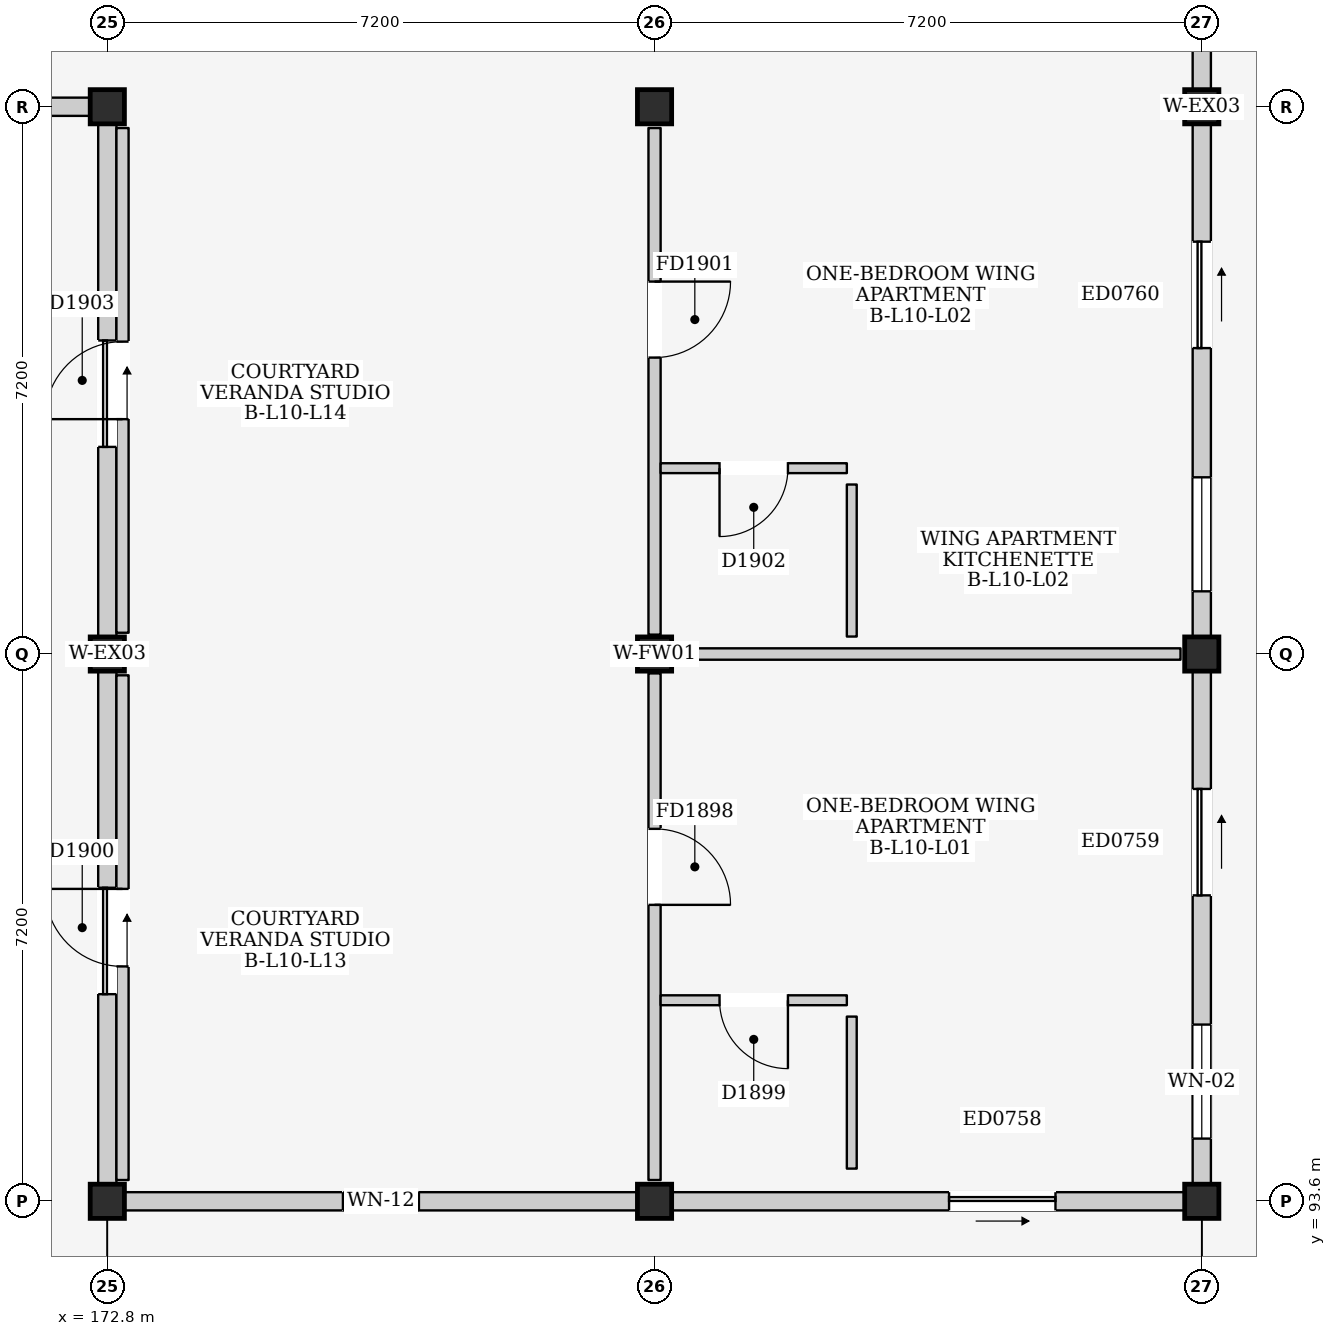
"""IFC4 building model, lengths in metres.
Left out: names, types, materials, properties, quantities, classifications, styles, units other than length and angle.
Written with IfcOpenShell. Run it as: python <this file> out.ifc"""

import sys

from ifc_helpers import new_model, si_unit, direction, frame, frame_2d, origin, origin_2d, place, context, subcontext, project, spatial, rectangle, extrude, element, fill, save


model = new_model("IFC4")
c1 = context("Model", 3, precision=1e-05, world=origin(), true_north=direction((0.0, 1.0)))
c2 = subcontext(c1, "Body", "Model", "MODEL_VIEW")
j1 = project(units=[si_unit("LENGTHUNIT", "METRE"), si_unit("PLANEANGLEUNIT", "RADIAN")], contexts=[c1])
p1 = place(None, origin())
s1 = spatial("IfcSite", under=j1, at=p1, CompositionType="ELEMENT")
p2 = place(p1, origin())
s2 = spatial("IfcBuilding", under=s1, at=p2, CompositionType="ELEMENT")
p3 = place(p2, frame((0.0, 0.0, 34.8)))
s3 = spatial("IfcBuildingStorey", under=s2, at=p3, CompositionType="ELEMENT", Elevation=34.8)
for number, where, z_axis, x_axis in (
    (1, (172.8, 93.6, 0.0), (0.0, 0.0, 1.0), (1.0, 0.0, 0.0)),
    (2, (172.8, 100.8, 0.0), (0.0, 0.0, 1.0), (1.0, 0.0, 0.0)),
    (3, (172.8, 108.0, 0.0), (0.0, 0.0, 1.0), (1.0, 0.0, 0.0)),
    (4, (180.0, 93.6, 0.0), (0.0, 0.0, 1.0), (1.0, 0.0, 0.0)),
    (5, (180.0, 100.8, 0.0), (0.0, 0.0, 1.0), (1.0, 0.0, 0.0)),
    (6, (180.0, 108.0, 0.0), (0.0, 0.0, 1.0), (1.0, 0.0, 0.0)),
    (7, (187.2, 93.6, 0.0), (0.0, 0.0, 1.0), (1.0, 0.0, 0.0)),
    (8, (187.2, 100.8, 0.0), (0.0, 0.0, 1.0), (1.0, 0.0, 0.0)),
    (9, (187.2, 108.0, 0.0), (0.0, 0.0, 1.0), (1.0, 0.0, 0.0)),
):
    element("IfcColumn", number, at=place(p3, frame(where, z_axis=z_axis, x_axis=x_axis)), inside=s3, PredefinedType="COLUMN", context=c2, shape_type="SweptSolid", body=[
        extrude(rectangle(XDim=0.45, YDim=0.45, at=origin_2d()), origin(), (0.0, 0.0, 1.0), 3.2),
    ])
p4 = place(p3, frame((165.825, 108.0, 0.0), z_axis=(0.0, 0.0, 1.0), x_axis=(1.0, 0.0, 0.0)))
e10 = element("IfcWall", 10, at=p4, inside=s3, PredefinedType="ELEMENTEDWALL", context=c2, shape_type="SweptSolid", body=[
    extrude(rectangle(XDim=6.75, YDim=0.24, at=frame_2d((3.375, 0.0))), origin(), (0.0, 0.0, 1.0), 2.345),
])
p5 = place(p4, frame((2.875, 0.0, 1.2)))
e11 = element("IfcOpeningElement", 11, at=p5, cuts=e10, PredefinedType="OPENING", context=c2, shape_type="SweptSolid", body=[
    extrude(rectangle(XDim=1.0, YDim=0.9, at=frame_2d((0.5, 0.45))), frame((0.0, 0.135, 0.0), z_axis=(0.0, -1.0, 0.0), x_axis=(1.0, 0.0, 0.0)), (0.0, 0.0, 1.0), 0.27),
])
p6 = place(p3, frame((173.025, 93.6, 0.0), z_axis=(0.0, 0.0, 1.0), x_axis=(1.0, 0.0, 0.0)))
e12 = element("IfcWall", 12, at=p6, inside=s3, PredefinedType="ELEMENTEDWALL", context=c2, shape_type="SweptSolid", body=[
    extrude(rectangle(XDim=6.75, YDim=0.24, at=frame_2d((3.375, 0.0))), origin(), (0.0, 0.0, 1.0), 2.345),
])
p7 = place(p6, frame((2.875, 0.0, 1.1)))
e13 = element("IfcOpeningElement", 13, at=p7, cuts=e12, PredefinedType="OPENING", context=c2, shape_type="SweptSolid", body=[
    extrude(rectangle(XDim=1.0, YDim=0.9, at=frame_2d((0.5, 0.45))), frame((0.0, 0.135, 0.0), z_axis=(0.0, -1.0, 0.0), x_axis=(1.0, 0.0, 0.0)), (0.0, 0.0, 1.0), 0.27),
])
p8 = place(p3, frame((172.8, 93.825, 0.0), z_axis=(0.0, 0.0, 1.0), x_axis=(0.0, 1.0, 0.0)))
e14 = element("IfcWall", 14, at=p8, inside=s3, PredefinedType="ELEMENTEDWALL", context=c2, shape_type="SweptSolid", body=[
    extrude(rectangle(XDim=6.75, YDim=0.24, at=frame_2d((3.375, 0.0))), origin(), (0.0, 0.0, 1.0), 2.445),
])
p9 = place(p8, frame((2.5, 0.0, 0.0)))
e15 = element("IfcOpeningElement", 15, at=p9, cuts=e14, PredefinedType="OPENING", context=c2, shape_type="SweptSolid", body=[
    extrude(rectangle(XDim=1.4, YDim=2.1, at=frame_2d((0.7, 1.05))), frame((0.0, 0.135, 0.0), z_axis=(0.0, -1.0, 0.0), x_axis=(1.0, 0.0, 0.0)), (0.0, 0.0, 1.0), 0.27),
])
p10 = place(p3, frame((172.8, 101.025, 0.0), z_axis=(0.0, 0.0, 1.0), x_axis=(0.0, 1.0, 0.0)))
e16 = element("IfcWall", 16, at=p10, inside=s3, PredefinedType="ELEMENTEDWALL", context=c2, shape_type="SweptSolid", body=[
    extrude(rectangle(XDim=6.75, YDim=0.24, at=frame_2d((3.375, 0.0))), origin(), (0.0, 0.0, 1.0), 2.445),
])
p11 = place(p10, frame((2.5, 0.0, 0.0)))
e17 = element("IfcOpeningElement", 17, at=p11, cuts=e16, PredefinedType="OPENING", context=c2, shape_type="SweptSolid", body=[
    extrude(rectangle(XDim=1.4, YDim=2.1, at=frame_2d((0.7, 1.05))), frame((0.0, 0.135, 0.0), z_axis=(0.0, -1.0, 0.0), x_axis=(1.0, 0.0, 0.0)), (0.0, 0.0, 1.0), 0.27),
])
p12 = place(p3, frame((180.225, 93.6, 0.0), z_axis=(0.0, 0.0, 1.0), x_axis=(1.0, 0.0, 0.0)))
e18 = element("IfcWall", 18, at=p12, inside=s3, PredefinedType="ELEMENTEDWALL", context=c2, shape_type="SweptSolid", body=[
    extrude(rectangle(XDim=6.75, YDim=0.24, at=frame_2d((3.375, 0.0))), origin(), (0.0, 0.0, 1.0), 2.345),
])
p13 = place(p12, frame((3.65, 0.0, 0.0)))
e19 = element("IfcOpeningElement", 19, at=p13, cuts=e18, PredefinedType="OPENING", context=c2, shape_type="SweptSolid", body=[
    extrude(rectangle(XDim=1.4, YDim=2.1, at=frame_2d((0.7, 1.05))), frame((0.0, 0.135, 0.0), z_axis=(0.0, -1.0, 0.0), x_axis=(1.0, 0.0, 0.0)), (0.0, 0.0, 1.0), 0.27),
])
p14 = place(p3, frame((187.2, 93.825, 0.0), z_axis=(0.0, 0.0, 1.0), x_axis=(0.0, 1.0, 0.0)))
e20 = element("IfcWall", 20, at=p14, inside=s3, PredefinedType="ELEMENTEDWALL", context=c2, shape_type="SweptSolid", body=[
    extrude(rectangle(XDim=6.75, YDim=0.24, at=frame_2d((3.375, 0.0))), origin(), (0.0, 0.0, 1.0), 2.495),
])
p15 = place(p14, frame((3.8, 0.0, 0.0)))
e21 = element("IfcOpeningElement", 21, at=p15, cuts=e20, PredefinedType="OPENING", context=c2, shape_type="SweptSolid", body=[
    extrude(rectangle(XDim=1.4, YDim=2.1, at=frame_2d((0.7, 1.05))), frame((0.0, 0.135, 0.0), z_axis=(0.0, -1.0, 0.0), x_axis=(1.0, 0.0, 0.0)), (0.0, 0.0, 1.0), 0.27),
])
p16 = place(p14, frame((0.6, 0.0, 0.885)))
e22 = element("IfcOpeningElement", 22, at=p16, cuts=e20, PredefinedType="OPENING", context=c2, shape_type="SweptSolid", body=[
    extrude(rectangle(XDim=1.5, YDim=1.5, at=frame_2d((0.75, 0.75))), frame((0.0, 0.135, 0.0), z_axis=(0.0, -1.0, 0.0), x_axis=(1.0, 0.0, 0.0)), (0.0, 0.0, 1.0), 0.27),
])
p17 = place(p3, frame((187.2, 101.025, 0.0), z_axis=(0.0, 0.0, 1.0), x_axis=(0.0, 1.0, 0.0)))
e23 = element("IfcWall", 23, at=p17, inside=s3, PredefinedType="ELEMENTEDWALL", context=c2, shape_type="SweptSolid", body=[
    extrude(rectangle(XDim=6.75, YDim=0.24, at=frame_2d((3.375, 0.0))), origin(), (0.0, 0.0, 1.0), 2.495),
])
p18 = place(p17, frame((3.8, 0.0, 0.0)))
e24 = element("IfcOpeningElement", 24, at=p18, cuts=e23, PredefinedType="OPENING", context=c2, shape_type="SweptSolid", body=[
    extrude(rectangle(XDim=1.4, YDim=2.1, at=frame_2d((0.7, 1.05))), frame((0.0, 0.135, 0.0), z_axis=(0.0, -1.0, 0.0), x_axis=(1.0, 0.0, 0.0)), (0.0, 0.0, 1.0), 0.27),
])
p19 = place(p17, frame((0.6, 0.0, 0.885)))
e25 = element("IfcOpeningElement", 25, at=p19, cuts=e23, PredefinedType="OPENING", context=c2, shape_type="SweptSolid", body=[
    extrude(rectangle(XDim=1.5, YDim=1.5, at=frame_2d((0.75, 0.75))), frame((0.0, 0.135, 0.0), z_axis=(0.0, -1.0, 0.0), x_axis=(1.0, 0.0, 0.0)), (0.0, 0.0, 1.0), 0.27),
])
p20 = place(p3, frame((187.2, 108.225, 0.0), z_axis=(0.0, 0.0, 1.0), x_axis=(0.0, 1.0, 0.0)))
e26 = element("IfcWall", 26, at=p20, inside=s3, PredefinedType="ELEMENTEDWALL", context=c2, shape_type="SweptSolid", body=[
    extrude(rectangle(XDim=6.75, YDim=0.24, at=frame_2d((3.375, 0.0))), origin(), (0.0, 0.0, 1.0), 2.495),
])
p21 = place(p20, frame((3.65, 0.0, 0.0)))
e27 = element("IfcOpeningElement", 27, at=p21, cuts=e26, PredefinedType="OPENING", context=c2, shape_type="SweptSolid", body=[
    extrude(rectangle(XDim=1.4, YDim=2.1, at=frame_2d((0.7, 1.05))), frame((0.0, 0.135, 0.0), z_axis=(0.0, -1.0, 0.0), x_axis=(1.0, 0.0, 0.0)), (0.0, 0.0, 1.0), 0.27),
])
p22 = place(p3, frame((180.0, 93.88, 0.0), z_axis=(0.0, 0.0, 1.0), x_axis=(0.0, 1.0, 0.0)))
e28 = element("IfcWall", 28, at=p22, inside=s3, PredefinedType="PARTITIONING", context=c2, shape_type="SweptSolid", body=[
    extrude(rectangle(XDim=6.665, YDim=0.16, at=frame_2d((3.333, 0.0))), origin(), (0.0, 0.0, 1.0), 2.445),
])
p23 = place(p22, frame((3.62, 0.0, 0.0)))
e29 = element("IfcOpeningElement", 29, at=p23, cuts=e28, PredefinedType="OPENING", context=c2, shape_type="SweptSolid", body=[
    extrude(rectangle(XDim=1.0, YDim=2.15, at=frame_2d((0.5, 1.075))), frame((0.0, 0.095, 0.0), z_axis=(0.0, -1.0, 0.0), x_axis=(1.0, 0.0, 0.0)), (0.0, 0.0, 1.0), 0.19),
])
p24 = place(p3, frame((180.28, 100.8, 0.0), z_axis=(0.0, 0.0, 1.0), x_axis=(1.0, 0.0, 0.0)))
e30 = element("IfcWall", 30, at=p24, inside=s3, PredefinedType="PARTITIONING", context=c2, shape_type="SweptSolid", body=[
    extrude(rectangle(XDim=6.64, YDim=0.15, at=frame_2d((3.32, 0.0))), origin(), (0.0, 0.0, 1.0), 2.345),
])
p25 = place(p3, frame((180.08, 96.245, 0.0), z_axis=(0.0, 0.0, 1.0), x_axis=(1.0, 0.0, 0.0)))
e31 = element("IfcWall", 31, at=p25, inside=s3, PredefinedType="PARTITIONING", context=c2, shape_type="SweptSolid", body=[
    extrude(rectangle(XDim=2.45, YDim=0.13, at=frame_2d((1.225, 0.0))), origin(), (0.0, 0.0, 1.0), 2.96),
])
p26 = place(p25, frame((0.775, 0.0, 0.0)))
e32 = element("IfcOpeningElement", 32, at=p26, cuts=e31, PredefinedType="OPENING", context=c2, shape_type="SweptSolid", body=[
    extrude(rectangle(XDim=0.9, YDim=2.1, at=frame_2d((0.45, 1.05))), frame((0.0, 0.08, 0.0), z_axis=(0.0, -1.0, 0.0), x_axis=(1.0, 0.0, 0.0)), (0.0, 0.0, 1.0), 0.16),
])
p27 = place(p3, frame((182.595, 94.03, 0.0), z_axis=(0.0, 0.0, 1.0), x_axis=(0.0, 1.0, 0.0)))
e33 = element("IfcWall", 33, at=p27, inside=s3, PredefinedType="PARTITIONING", context=c2, shape_type="SweptSolid", body=[
    extrude(rectangle(XDim=2.0, YDim=0.13, at=frame_2d((1.0, 0.0))), origin(), (0.0, 0.0, 1.0), 2.96),
])
p28 = place(p3, frame((173.0, 93.88, 0.0), z_axis=(0.0, 0.0, 1.0), x_axis=(0.0, 1.0, 0.0)))
e34 = element("IfcWall", 34, at=p28, inside=s3, PredefinedType="PARTITIONING", context=c2, shape_type="SweptSolid", body=[
    extrude(rectangle(XDim=6.64, YDim=0.16, at=frame_2d((3.32, 0.0))), origin(), (0.0, 0.0, 1.0), 2.96),
])
p29 = place(p28, frame((2.81, 0.0, 0.0)))
e35 = element("IfcOpeningElement", 35, at=p29, cuts=e34, PredefinedType="OPENING", context=c2, shape_type="SweptSolid", body=[
    extrude(rectangle(XDim=1.02, YDim=2.18, at=frame_2d((0.51, 1.09))), frame((0.0, 0.095, 0.0), z_axis=(0.0, -1.0, 0.0), x_axis=(1.0, 0.0, 0.0)), (0.0, 0.0, 1.0), 0.19),
])
p30 = place(p3, frame((180.0, 101.055, 0.0), z_axis=(0.0, 0.0, 1.0), x_axis=(0.0, 1.0, 0.0)))
e36 = element("IfcWall", 36, at=p30, inside=s3, PredefinedType="PARTITIONING", context=c2, shape_type="SweptSolid", body=[
    extrude(rectangle(XDim=6.665, YDim=0.16, at=frame_2d((3.333, 0.0))), origin(), (0.0, 0.0, 1.0), 2.445),
])
p31 = place(p30, frame((3.645, 0.0, 0.0)))
e37 = element("IfcOpeningElement", 37, at=p31, cuts=e36, PredefinedType="OPENING", context=c2, shape_type="SweptSolid", body=[
    extrude(rectangle(XDim=1.0, YDim=2.15, at=frame_2d((0.5, 1.075))), frame((0.0, 0.095, 0.0), z_axis=(0.0, -1.0, 0.0), x_axis=(1.0, 0.0, 0.0)), (0.0, 0.0, 1.0), 0.19),
])
p32 = place(p3, frame((180.08, 103.245, 0.0), z_axis=(0.0, 0.0, 1.0), x_axis=(1.0, 0.0, 0.0)))
e38 = element("IfcWall", 38, at=p32, inside=s3, PredefinedType="PARTITIONING", context=c2, shape_type="SweptSolid", body=[
    extrude(rectangle(XDim=2.45, YDim=0.13, at=frame_2d((1.225, 0.0))), origin(), (0.0, 0.0, 1.0), 2.96),
])
p33 = place(p32, frame((0.775, 0.0, 0.0)))
e39 = element("IfcOpeningElement", 39, at=p33, cuts=e38, PredefinedType="OPENING", context=c2, shape_type="SweptSolid", body=[
    extrude(rectangle(XDim=0.9, YDim=2.1, at=frame_2d((0.45, 1.05))), frame((0.0, 0.08, 0.0), z_axis=(0.0, -1.0, 0.0), x_axis=(1.0, 0.0, 0.0)), (0.0, 0.0, 1.0), 0.16),
])
p34 = place(p3, frame((182.595, 101.03, 0.0), z_axis=(0.0, 0.0, 1.0), x_axis=(0.0, 1.0, 0.0)))
e40 = element("IfcWall", 40, at=p34, inside=s3, PredefinedType="PARTITIONING", context=c2, shape_type="SweptSolid", body=[
    extrude(rectangle(XDim=2.0, YDim=0.13, at=frame_2d((1.0, 0.0))), origin(), (0.0, 0.0, 1.0), 2.96),
])
p35 = place(p3, frame((173.0, 101.08, 0.0), z_axis=(0.0, 0.0, 1.0), x_axis=(0.0, 1.0, 0.0)))
e41 = element("IfcWall", 41, at=p35, inside=s3, PredefinedType="PARTITIONING", context=c2, shape_type="SweptSolid", body=[
    extrude(rectangle(XDim=6.64, YDim=0.16, at=frame_2d((3.32, 0.0))), origin(), (0.0, 0.0, 1.0), 2.96),
])
p36 = place(p35, frame((2.81, 0.0, 0.0)))
e42 = element("IfcOpeningElement", 42, at=p36, cuts=e41, PredefinedType="OPENING", context=c2, shape_type="SweptSolid", body=[
    extrude(rectangle(XDim=1.02, YDim=2.18, at=frame_2d((0.51, 1.09))), frame((0.0, 0.095, 0.0), z_axis=(0.0, -1.0, 0.0), x_axis=(1.0, 0.0, 0.0)), (0.0, 0.0, 1.0), 0.19),
])
p37 = place(p7, origin())
e43 = element("IfcWindow", 43, at=p37, inside=s3, PartitioningType="SINGLE_PANEL", PredefinedType="WINDOW", context=c2, shape_type="SweptSolid", body=[
    extrude(rectangle(XDim=1.0, YDim=0.9, at=frame_2d((0.5, 0.45))), frame((0.0, 0.03, 0.0), z_axis=(0.0, -1.0, 0.0), x_axis=(1.0, 0.0, 0.0)), (0.0, 0.0, 1.0), 0.06),
])
fill(e13, e43)
p38 = place(p9, frame((1.4, 0.0, 0.0), z_axis=(0.0, 0.0, 1.0), x_axis=(-1.0, 0.0, 0.0)))
e44 = element("IfcDoor", 44, at=p38, inside=s3, OperationType="SLIDING_TO_RIGHT", PredefinedType="DOOR", context=c2, shape_type="SweptSolid", body=[
    extrude(rectangle(XDim=1.4, YDim=2.1, at=frame_2d((0.7, 1.05))), frame((0.0, 0.025, 0.0), z_axis=(0.0, -1.0, 0.0), x_axis=(1.0, 0.0, 0.0)), (0.0, 0.0, 1.0), 0.05),
])
fill(e15, e44)
p39 = place(p11, frame((1.4, 0.0, 0.0), z_axis=(0.0, 0.0, 1.0), x_axis=(-1.0, 0.0, 0.0)))
e45 = element("IfcDoor", 45, at=p39, inside=s3, OperationType="SLIDING_TO_RIGHT", PredefinedType="DOOR", context=c2, shape_type="SweptSolid", body=[
    extrude(rectangle(XDim=1.4, YDim=2.1, at=frame_2d((0.7, 1.05))), frame((0.0, 0.025, 0.0), z_axis=(0.0, -1.0, 0.0), x_axis=(1.0, 0.0, 0.0)), (0.0, 0.0, 1.0), 0.05),
])
fill(e17, e45)
p40 = place(p13, frame((1.4, 0.0, 0.0), z_axis=(0.0, 0.0, 1.0), x_axis=(-1.0, 0.0, 0.0)))
e46 = element("IfcDoor", 46, at=p40, inside=s3, OperationType="SLIDING_TO_RIGHT", PredefinedType="DOOR", context=c2, shape_type="SweptSolid", body=[
    extrude(rectangle(XDim=1.4, YDim=2.1, at=frame_2d((0.7, 1.05))), frame((0.0, 0.025, 0.0), z_axis=(0.0, -1.0, 0.0), x_axis=(1.0, 0.0, 0.0)), (0.0, 0.0, 1.0), 0.05),
])
fill(e19, e46)
p41 = place(p15, frame((1.4, 0.0, 0.0), z_axis=(0.0, 0.0, 1.0), x_axis=(-1.0, 0.0, 0.0)))
e47 = element("IfcDoor", 47, at=p41, inside=s3, OperationType="SLIDING_TO_RIGHT", PredefinedType="DOOR", context=c2, shape_type="SweptSolid", body=[
    extrude(rectangle(XDim=1.4, YDim=2.1, at=frame_2d((0.7, 1.05))), frame((0.0, 0.025, 0.0), z_axis=(0.0, -1.0, 0.0), x_axis=(1.0, 0.0, 0.0)), (0.0, 0.0, 1.0), 0.05),
])
fill(e21, e47)
p42 = place(p16, origin())
e48 = element("IfcWindow", 48, at=p42, inside=s3, PartitioningType="DOUBLE_PANEL_VERTICAL", PredefinedType="WINDOW", context=c2, shape_type="SweptSolid", body=[
    extrude(rectangle(XDim=1.5, YDim=1.5, at=frame_2d((0.75, 0.75))), frame((0.0, 0.03, 0.0), z_axis=(0.0, -1.0, 0.0), x_axis=(1.0, 0.0, 0.0)), (0.0, 0.0, 1.0), 0.06),
])
fill(e22, e48)
p43 = place(p18, frame((1.4, 0.0, 0.0), z_axis=(0.0, 0.0, 1.0), x_axis=(-1.0, 0.0, 0.0)))
e49 = element("IfcDoor", 49, at=p43, inside=s3, OperationType="SLIDING_TO_RIGHT", PredefinedType="DOOR", context=c2, shape_type="SweptSolid", body=[
    extrude(rectangle(XDim=1.4, YDim=2.1, at=frame_2d((0.7, 1.05))), frame((0.0, 0.025, 0.0), z_axis=(0.0, -1.0, 0.0), x_axis=(1.0, 0.0, 0.0)), (0.0, 0.0, 1.0), 0.05),
])
fill(e24, e49)
p44 = place(p19, origin())
e50 = element("IfcWindow", 50, at=p44, inside=s3, PartitioningType="DOUBLE_PANEL_VERTICAL", PredefinedType="WINDOW", context=c2, shape_type="SweptSolid", body=[
    extrude(rectangle(XDim=1.5, YDim=1.5, at=frame_2d((0.75, 0.75))), frame((0.0, 0.03, 0.0), z_axis=(0.0, -1.0, 0.0), x_axis=(1.0, 0.0, 0.0)), (0.0, 0.0, 1.0), 0.06),
])
fill(e25, e50)
p45 = place(p23, frame((1.0, 0.0, 0.0), z_axis=(0.0, 0.0, 1.0), x_axis=(-1.0, 0.0, 0.0)))
e51 = element("IfcDoor", 51, at=p45, inside=s3, OperationType="SINGLE_SWING_RIGHT", PredefinedType="DOOR", context=c2, shape_type="SweptSolid", body=[
    extrude(rectangle(XDim=1.0, YDim=2.15, at=frame_2d((0.5, 1.075))), frame((0.0, 0.025, 0.0), z_axis=(0.0, -1.0, 0.0), x_axis=(1.0, 0.0, 0.0)), (0.0, 0.0, 1.0), 0.05),
])
fill(e29, e51)
p46 = place(p26, frame((0.9, 0.0, 0.0), z_axis=(0.0, 0.0, 1.0), x_axis=(-1.0, 0.0, 0.0)))
e52 = element("IfcDoor", 52, at=p46, inside=s3, OperationType="SINGLE_SWING_LEFT", PredefinedType="DOOR", context=c2, shape_type="SweptSolid", body=[
    extrude(rectangle(XDim=0.9, YDim=2.1, at=frame_2d((0.45, 1.05))), frame((0.0, 0.025, 0.0), z_axis=(0.0, -1.0, 0.0), x_axis=(1.0, 0.0, 0.0)), (0.0, 0.0, 1.0), 0.05),
])
fill(e32, e52)
p47 = place(p29, origin())
e53 = element("IfcDoor", 53, at=p47, inside=s3, OperationType="SINGLE_SWING_RIGHT", PredefinedType="DOOR", context=c2, shape_type="SweptSolid", body=[
    extrude(rectangle(XDim=1.02, YDim=2.18, at=frame_2d((0.51, 1.09))), frame((0.0, 0.025, 0.0), z_axis=(0.0, -1.0, 0.0), x_axis=(1.0, 0.0, 0.0)), (0.0, 0.0, 1.0), 0.05),
])
fill(e35, e53)
p48 = place(p31, frame((1.0, 0.0, 0.0), z_axis=(0.0, 0.0, 1.0), x_axis=(-1.0, 0.0, 0.0)))
e54 = element("IfcDoor", 54, at=p48, inside=s3, OperationType="SINGLE_SWING_LEFT", PredefinedType="DOOR", context=c2, shape_type="SweptSolid", body=[
    extrude(rectangle(XDim=1.0, YDim=2.15, at=frame_2d((0.5, 1.075))), frame((0.0, 0.025, 0.0), z_axis=(0.0, -1.0, 0.0), x_axis=(1.0, 0.0, 0.0)), (0.0, 0.0, 1.0), 0.05),
])
fill(e37, e54)
p49 = place(p33, frame((0.9, 0.0, 0.0), z_axis=(0.0, 0.0, 1.0), x_axis=(-1.0, 0.0, 0.0)))
e55 = element("IfcDoor", 55, at=p49, inside=s3, OperationType="SINGLE_SWING_RIGHT", PredefinedType="DOOR", context=c2, shape_type="SweptSolid", body=[
    extrude(rectangle(XDim=0.9, YDim=2.1, at=frame_2d((0.45, 1.05))), frame((0.0, 0.025, 0.0), z_axis=(0.0, -1.0, 0.0), x_axis=(1.0, 0.0, 0.0)), (0.0, 0.0, 1.0), 0.05),
])
fill(e39, e55)
p50 = place(p36, origin())
e56 = element("IfcDoor", 56, at=p50, inside=s3, OperationType="SINGLE_SWING_LEFT", PredefinedType="DOOR", context=c2, shape_type="SweptSolid", body=[
    extrude(rectangle(XDim=1.02, YDim=2.18, at=frame_2d((0.51, 1.09))), frame((0.0, 0.025, 0.0), z_axis=(0.0, -1.0, 0.0), x_axis=(1.0, 0.0, 0.0)), (0.0, 0.0, 1.0), 0.05),
])
fill(e42, e56)
save(model, sys.argv[1])
